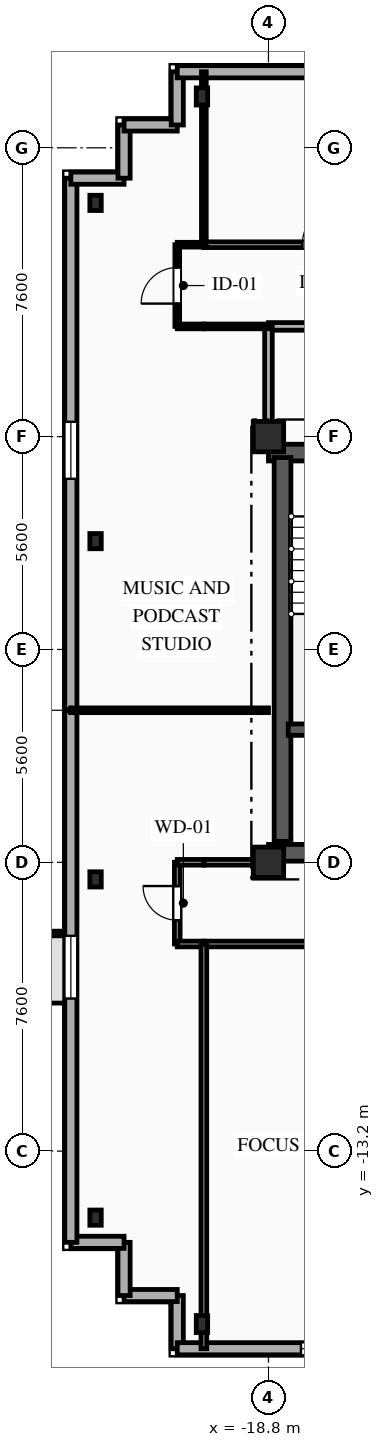
"""IFC4 building model, lengths in metres.
Left out: names, types, materials, properties, quantities, classifications, styles, units other than length and angle.
Written with IfcOpenShell. Run it as: python <this file> out.ifc"""

import sys

from ifc_helpers import new_model, si_unit, direction, frame, frame_2d, origin, origin_2d, place, context, subcontext, project, spatial, rectangle, i_section, extrude, element, fill, save


model = new_model("IFC4")
c1 = context("Model", 3, precision=1e-05, world=origin(), true_north=direction((0.0, 1.0)))
c2 = subcontext(c1, "Body", "Model", "MODEL_VIEW")
j1 = project(units=[si_unit("LENGTHUNIT", "METRE"), si_unit("PLANEANGLEUNIT", "RADIAN")], contexts=[c1])
p1 = place(None, origin())
s1 = spatial("IfcSite", under=j1, at=p1, CompositionType="ELEMENT")
p2 = place(p1, origin())
s2 = spatial("IfcBuilding", under=s1, at=p2, CompositionType="ELEMENT")
p3 = place(p2, frame((0.0, 0.0, 235.0)))
s3 = spatial("IfcBuildingStorey", under=s2, at=p3, CompositionType="ELEMENT", Elevation=235.0)
for number, where, z_axis, x_axis in (
    (1, (-18.8, -5.6, 0.0), (0.0, 0.0, 1.0), (1.0, 0.0, 0.0)),
    (2, (-18.8, 5.6, 0.0), (0.0, 0.0, 1.0), (1.0, 0.0, 0.0)),
):
    element("IfcColumn", number, at=place(p3, frame(where, z_axis=z_axis, x_axis=x_axis)), inside=s3, PredefinedType="COLUMN", context=c2, shape_type="SweptSolid", body=[
        extrude(rectangle(XDim=0.8, YDim=0.8, at=origin_2d()), origin(), (0.0, 0.0, 1.0), 3.35),
    ])
for number, where, z_axis, x_axis in (
    (3, (-20.55, -17.75, 0.0), (0.0, 0.0, 1.0), (1.0, 0.0, 0.0)),
    (4, (-20.55, 14.55, 0.0), (0.0, 0.0, 1.0), (1.0, 0.0, 0.0)),
):
    element("IfcColumn", number, at=place(p3, frame(where, z_axis=z_axis, x_axis=x_axis)), inside=s3, PredefinedType="COLUMN", context=c2, shape_type="SweptSolid", body=[
        extrude(i_section(OverallWidth=0.3, OverallDepth=0.45, WebThickness=0.014, FlangeThickness=0.026, FilletRadius=0.027, at=origin_2d()), origin(), (0.0, 0.0, 1.0), 3.35),
    ])
for number, where, z_axis, x_axis in (
    (5, (-23.35, 11.75, 0.0), (0.0, 0.0, 1.0), (1.0, 0.0, 0.0)),
    (6, (-23.35, 2.85, 0.0), (0.0, 0.0, 1.0), (1.0, 0.0, 0.0)),
    (7, (-23.35, -6.05, 0.0), (0.0, 0.0, 1.0), (1.0, 0.0, 0.0)),
    (8, (-23.35, -14.95, 0.0), (0.0, 0.0, 1.0), (1.0, 0.0, 0.0)),
):
    element("IfcColumn", number, at=place(p3, frame(where, z_axis=z_axis, x_axis=x_axis)), inside=s3, PredefinedType="COLUMN", context=c2, shape_type="SweptSolid", body=[
        extrude(i_section(OverallWidth=0.3, OverallDepth=0.4, WebThickness=0.013, FlangeThickness=0.024, FilletRadius=0.027, at=origin_2d()), origin(), (0.0, 0.0, 1.0), 3.35),
    ])
p4 = place(p3, frame((-21.2, -18.4, 0.0), z_axis=(0.0, 0.0, 1.0), x_axis=(0.0, 1.0, 0.0)))
e9 = element("IfcWall", 9, at=p4, inside=s3, PredefinedType="SOLIDWALL", context=c2, shape_type="SweptSolid", body=[
    extrude(rectangle(XDim=1.4, YDim=0.32, at=frame_2d((0.7, 0.0))), origin(), (0.0, 0.0, 1.0), 3.04),
])
p5 = place(p3, frame((-21.2, -17.0, 0.0), z_axis=(0.0, 0.0, 1.0), x_axis=(-1.0, 0.0, 0.0)))
e10 = element("IfcWall", 10, at=p5, inside=s3, PredefinedType="SOLIDWALL", context=c2, shape_type="SweptSolid", body=[
    extrude(rectangle(XDim=1.4, YDim=0.32, at=frame_2d((0.7, 0.0))), origin(), (0.0, 0.0, 1.0), 3.04),
])
for number, where, z_axis, x_axis in (
    (11, (-22.6, -17.0, 0.0), (0.0, 0.0, 1.0), (0.0, 1.0, 0.0)),
    (12, (-22.6, -15.6, 0.0), (0.0, 0.0, 1.0), (-1.0, 0.0, 0.0)),
):
    element("IfcWall", number, at=place(p3, frame(where, z_axis=z_axis, x_axis=x_axis)), inside=s3, PredefinedType="SOLIDWALL", context=c2, shape_type="SweptSolid", body=[
        extrude(rectangle(XDim=1.4, YDim=0.32, at=frame_2d((0.7, 0.0))), origin(), (0.0, 0.0, 1.0), 3.04),
    ])
p6 = place(p3, frame((-24.0, -15.6, 0.0), z_axis=(0.0, 0.0, 1.0), x_axis=(0.0, 1.0, 0.0)))
e13 = element("IfcWall", 13, at=p6, inside=s3, PredefinedType="SOLIDWALL", context=c2, shape_type="SweptSolid", body=[
    extrude(rectangle(XDim=28.0, YDim=0.32, at=frame_2d((14.0, 0.0))), origin(), (0.0, 0.0, 1.0), 3.04),
])
p7 = place(p6, frame((6.415, 0.0, 0.85)))
e14 = element("IfcOpeningElement", 14, at=p7, cuts=e13, PredefinedType="OPENING", context=c2, shape_type="SweptSolid", body=[
    extrude(rectangle(XDim=1.65, YDim=1.85, at=frame_2d((0.825, 0.925))), frame((0.0, 0.17, 0.0), z_axis=(0.0, -1.0, 0.0), x_axis=(1.0, 0.0, 0.0)), (0.0, 0.0, 1.0), 0.34),
])
p8 = place(p6, frame((20.09, 0.0, 0.85)))
e15 = element("IfcOpeningElement", 15, at=p8, cuts=e13, PredefinedType="OPENING", context=c2, shape_type="SweptSolid", body=[
    extrude(rectangle(XDim=1.5, YDim=1.85, at=frame_2d((0.75, 0.925))), frame((0.0, 0.17, 0.0), z_axis=(0.0, -1.0, 0.0), x_axis=(1.0, 0.0, 0.0)), (0.0, 0.0, 1.0), 0.34),
])
p9 = place(p3, frame((-24.0, 12.4, 0.0), z_axis=(0.0, 0.0, 1.0), x_axis=(1.0, 0.0, 0.0)))
e16 = element("IfcWall", 16, at=p9, inside=s3, PredefinedType="SOLIDWALL", context=c2, shape_type="SweptSolid", body=[
    extrude(rectangle(XDim=1.4, YDim=0.32, at=frame_2d((0.7, 0.0))), origin(), (0.0, 0.0, 1.0), 3.04),
])
for number, where, z_axis, x_axis in (
    (17, (-22.6, 12.4, 0.0), (0.0, 0.0, 1.0), (0.0, 1.0, 0.0)),
    (18, (-22.6, 13.8, 0.0), (0.0, 0.0, 1.0), (1.0, 0.0, 0.0)),
):
    element("IfcWall", number, at=place(p3, frame(where, z_axis=z_axis, x_axis=x_axis)), inside=s3, PredefinedType="SOLIDWALL", context=c2, shape_type="SweptSolid", body=[
        extrude(rectangle(XDim=1.4, YDim=0.32, at=frame_2d((0.7, 0.0))), origin(), (0.0, 0.0, 1.0), 3.04),
    ])
p10 = place(p3, frame((-21.2, 13.8, 0.0), z_axis=(0.0, 0.0, 1.0), x_axis=(0.0, 1.0, 0.0)))
e19 = element("IfcWall", 19, at=p10, inside=s3, PredefinedType="SOLIDWALL", context=c2, shape_type="SweptSolid", body=[
    extrude(rectangle(XDim=1.4, YDim=0.32, at=frame_2d((0.7, 0.0))), origin(), (0.0, 0.0, 1.0), 3.04),
])
p11 = place(p3, frame((-21.2, 15.2, 0.0), z_axis=(0.0, 0.0, 1.0), x_axis=(1.0, 0.0, 0.0)))
e20 = element("IfcWall", 20, at=p11, inside=s3, PredefinedType="SOLIDWALL", context=c2, shape_type="SweptSolid", body=[
    extrude(rectangle(XDim=42.0, YDim=0.32, at=frame_2d((21.0, 0.0))), origin(), (0.0, 0.0, 1.0), 3.04),
])
p12 = place(p11, frame((5.015, 0.0, 0.85)))
e21 = element("IfcOpeningElement", 21, at=p12, cuts=e20, PredefinedType="OPENING", context=c2, shape_type="SweptSolid", body=[
    extrude(rectangle(XDim=1.65, YDim=1.85, at=frame_2d((0.825, 0.925))), frame((0.0, 0.17, 0.0), z_axis=(0.0, -1.0, 0.0), x_axis=(1.0, 0.0, 0.0)), (0.0, 0.0, 1.0), 0.34),
])
p13 = place(p11, frame((16.53, 0.0, 0.85)))
e22 = element("IfcOpeningElement", 22, at=p13, cuts=e20, PredefinedType="OPENING", context=c2, shape_type="SweptSolid", body=[
    extrude(rectangle(XDim=1.5, YDim=1.85, at=frame_2d((0.75, 0.925))), frame((0.0, 0.17, 0.0), z_axis=(0.0, -1.0, 0.0), x_axis=(1.0, 0.0, 0.0)), (0.0, 0.0, 1.0), 0.34),
])
p14 = place(p11, frame((25.575, 0.0, 0.85)))
e23 = element("IfcOpeningElement", 23, at=p14, cuts=e20, PredefinedType="OPENING", context=c2, shape_type="SweptSolid", body=[
    extrude(rectangle(XDim=1.65, YDim=1.85, at=frame_2d((0.825, 0.925))), frame((0.0, 0.17, 0.0), z_axis=(0.0, -1.0, 0.0), x_axis=(1.0, 0.0, 0.0)), (0.0, 0.0, 1.0), 0.34),
])
p15 = place(p11, frame((35.735, 0.0, 0.85)))
e24 = element("IfcOpeningElement", 24, at=p15, cuts=e20, PredefinedType="OPENING", context=c2, shape_type="SweptSolid", body=[
    extrude(rectangle(XDim=1.65, YDim=1.85, at=frame_2d((0.825, 0.925))), frame((0.0, 0.17, 0.0), z_axis=(0.0, -1.0, 0.0), x_axis=(1.0, 0.0, 0.0)), (0.0, 0.0, 1.0), 0.34),
])
p16 = place(p3, frame((20.8, -18.4, 0.0), z_axis=(0.0, 0.0, 1.0), x_axis=(-1.0, 0.0, 0.0)))
e25 = element("IfcWall", 25, at=p16, inside=s3, PredefinedType="SOLIDWALL", context=c2, shape_type="SweptSolid", body=[
    extrude(rectangle(XDim=42.0, YDim=0.32, at=frame_2d((21.0, 0.0))), origin(), (0.0, 0.0, 1.0), 3.04),
])
p17 = place(p16, frame((3.015, 0.0, 0.85)))
e26 = element("IfcOpeningElement", 26, at=p17, cuts=e25, PredefinedType="OPENING", context=c2, shape_type="SweptSolid", body=[
    extrude(rectangle(XDim=1.65, YDim=1.85, at=frame_2d((0.825, 0.925))), frame((0.0, 0.17, 0.0), z_axis=(0.0, -1.0, 0.0), x_axis=(1.0, 0.0, 0.0)), (0.0, 0.0, 1.0), 0.34),
])
p18 = place(p16, frame((9.775, 0.0, 0.85)))
e27 = element("IfcOpeningElement", 27, at=p18, cuts=e25, PredefinedType="OPENING", context=c2, shape_type="SweptSolid", body=[
    extrude(rectangle(XDim=1.65, YDim=1.85, at=frame_2d((0.825, 0.925))), frame((0.0, 0.17, 0.0), z_axis=(0.0, -1.0, 0.0), x_axis=(1.0, 0.0, 0.0)), (0.0, 0.0, 1.0), 0.34),
])
p19 = place(p16, frame((19.74, 0.0, 0.85)))
e28 = element("IfcOpeningElement", 28, at=p19, cuts=e25, PredefinedType="OPENING", context=c2, shape_type="SweptSolid", body=[
    extrude(rectangle(XDim=2.2, YDim=1.85, at=frame_2d((1.1, 0.925))), frame((0.0, 0.17, 0.0), z_axis=(0.0, -1.0, 0.0), x_axis=(1.0, 0.0, 0.0)), (0.0, 0.0, 1.0), 0.34),
])
p20 = place(p16, frame((30.255, 0.0, 0.85)))
e29 = element("IfcOpeningElement", 29, at=p20, cuts=e25, PredefinedType="OPENING", context=c2, shape_type="SweptSolid", body=[
    extrude(rectangle(XDim=1.65, YDim=1.85, at=frame_2d((0.825, 0.925))), frame((0.0, 0.17, 0.0), z_axis=(0.0, -1.0, 0.0), x_axis=(1.0, 0.0, 0.0)), (0.0, 0.0, 1.0), 0.34),
])
p21 = place(p16, frame((37.095, 0.0, 0.85)))
e30 = element("IfcOpeningElement", 30, at=p21, cuts=e25, PredefinedType="OPENING", context=c2, shape_type="SweptSolid", body=[
    extrude(rectangle(XDim=1.65, YDim=1.85, at=frame_2d((0.825, 0.925))), frame((0.0, 0.17, 0.0), z_axis=(0.0, -1.0, 0.0), x_axis=(1.0, 0.0, 0.0)), (0.0, 0.0, 1.0), 0.34),
])
p22 = place(p3, frame((-18.8, 5.18, 0.0), z_axis=(0.0, 0.0, 1.0), x_axis=(1.0, 0.0, 0.0)))
e31 = element("IfcWall", 31, at=p22, inside=s3, PredefinedType="SHEAR", context=c2, shape_type="SweptSolid", body=[
    extrude(rectangle(XDim=9.6, YDim=0.44, at=frame_2d((4.8, 0.0))), origin(), (0.0, 0.0, 1.0), 3.04),
])
p23 = place(p22, frame((1.55, 0.0, 0.0)))
e32 = element("IfcOpeningElement", 32, at=p23, cuts=e31, PredefinedType="OPENING", context=c2, shape_type="SweptSolid", body=[
    extrude(rectangle(XDim=1.1, YDim=2.15, at=frame_2d((0.55, 1.075))), frame((0.0, 0.23, 0.0), z_axis=(0.0, -1.0, 0.0), x_axis=(1.0, 0.0, 0.0)), (0.0, 0.0, 1.0), 0.46),
])
p24 = place(p22, frame((4.775, 0.0, 0.0)))
e33 = element("IfcOpeningElement", 33, at=p24, cuts=e31, PredefinedType="OPENING", context=c2, shape_type="SweptSolid", body=[
    extrude(rectangle(XDim=1.05, YDim=2.1, at=frame_2d((0.525, 1.05))), frame((0.0, 0.23, 0.0), z_axis=(0.0, -1.0, 0.0), x_axis=(1.0, 0.0, 0.0)), (0.0, 0.0, 1.0), 0.46),
])
p25 = place(p3, frame((-18.8, -5.35, 0.0), z_axis=(0.0, 0.0, 1.0), x_axis=(1.0, 0.0, 0.0)))
e34 = element("IfcWall", 34, at=p25, inside=s3, PredefinedType="SHEAR", context=c2, shape_type="SweptSolid", body=[
    extrude(rectangle(XDim=9.6, YDim=0.44, at=frame_2d((4.8, 0.0))), origin(), (0.0, 0.0, 1.0), 3.04),
])
p26 = place(p25, frame((1.05, 0.0, 0.0)))
e35 = element("IfcOpeningElement", 35, at=p26, cuts=e34, PredefinedType="OPENING", context=c2, shape_type="SweptSolid", body=[
    extrude(rectangle(XDim=0.9, YDim=2.1, at=frame_2d((0.45, 1.05))), frame((0.0, 0.23, 0.0), z_axis=(0.0, -1.0, 0.0), x_axis=(1.0, 0.0, 0.0)), (0.0, 0.0, 1.0), 0.46),
])
p27 = place(p3, frame((-18.43, -5.05, 0.0), z_axis=(0.0, 0.0, 1.0), x_axis=(0.0, 1.0, 0.0)))
e36 = element("IfcWall", 36, at=p27, inside=s3, PredefinedType="SHEAR", context=c2, shape_type="SweptSolid", body=[
    extrude(rectangle(XDim=10.1, YDim=0.44, at=frame_2d((5.05, 0.0))), origin(), (0.0, 0.0, 1.0), 3.04),
])
p28 = place(p3, frame((-18.28, -2.11, 0.0), z_axis=(0.0, 0.0, 1.0), x_axis=(1.0, 0.0, 0.0)))
e37 = element("IfcWall", 37, at=p28, inside=s3, PredefinedType="SHEAR", context=c2, shape_type="SweptSolid", body=[
    extrude(rectangle(XDim=3.18, YDim=0.3, at=frame_2d((1.59, 0.0))), origin(), (0.0, 0.0, 1.0), 3.04),
])
p29 = place(p3, frame((-12.0, 8.5, 0.0), z_axis=(0.0, 0.0, 1.0), x_axis=(-1.0, 0.0, 0.0)))
e38 = element("IfcWall", 38, at=p29, inside=s3, PredefinedType="PARTITIONING", context=c2, shape_type="SweptSolid", body=[
    extrude(rectangle(XDim=6.8, YDim=0.2, at=frame_2d((3.4, 0.0))), origin(), (0.0, 0.0, 1.0), 3.04),
])
p30 = place(p29, frame((1.715, 0.0, 0.0)))
e39 = element("IfcOpeningElement", 39, at=p30, cuts=e38, PredefinedType="OPENING", context=c2, shape_type="SweptSolid", body=[
    extrude(rectangle(XDim=1.1, YDim=2.15, at=frame_2d((0.55, 1.075))), frame((0.0, 0.11, 0.0), z_axis=(0.0, -1.0, 0.0), x_axis=(1.0, 0.0, 0.0)), (0.0, 0.0, 1.0), 0.22),
])
p31 = place(p3, frame((-18.8, 8.5, 0.0), z_axis=(0.0, 0.0, 1.0), x_axis=(0.0, -1.0, 0.0)))
e40 = element("IfcWall", 40, at=p31, inside=s3, PredefinedType="PARTITIONING", context=c2, shape_type="SweptSolid", body=[
    extrude(rectangle(XDim=2.9, YDim=0.2, at=frame_2d((1.45, 0.0))), origin(), (0.0, 0.0, 1.0), 2.665),
])
p32 = place(p3, frame((-21.2, 8.5, 0.0), z_axis=(0.0, 0.0, 1.0), x_axis=(0.0, 1.0, 0.0)))
e41 = element("IfcWall", 41, at=p32, inside=s3, PredefinedType="PARTITIONING", context=c2, shape_type="SweptSolid", body=[
    extrude(rectangle(XDim=2.15, YDim=0.125, at=frame_2d((1.075, 0.0))), origin(), (0.0, 0.0, 1.0), 2.695),
])
p33 = place(p32, frame((0.6, 0.0, 0.0)))
e42 = element("IfcOpeningElement", 42, at=p33, cuts=e41, PredefinedType="OPENING", context=c2, shape_type="SweptSolid", body=[
    extrude(rectangle(XDim=0.95, YDim=2.1, at=frame_2d((0.475, 1.05))), frame((0.0, 0.073, 0.0), z_axis=(0.0, -1.0, 0.0), x_axis=(1.0, 0.0, 0.0)), (0.0, 0.0, 1.0), 0.145),
])
p34 = place(p3, frame((-18.8, 8.5, 0.0), z_axis=(0.0, 0.0, 1.0), x_axis=(-1.0, 0.0, 0.0)))
e43 = element("IfcWall", 43, at=p34, inside=s3, PredefinedType="PARTITIONING", context=c2, shape_type="SweptSolid", body=[
    extrude(rectangle(XDim=1.7, YDim=0.125, at=frame_2d((0.85, 0.0))), origin(), (0.0, 0.0, 1.0), 3.04),
])
for number, where, z_axis, x_axis in (
    (44, (-20.5, 8.5, 0.0), (0.0, 0.0, 1.0), (-1.0, 0.0, 0.0)),
    (45, (-21.2, 10.65, 0.0), (0.0, 0.0, 1.0), (1.0, 0.0, 0.0)),
):
    element("IfcWall", number, at=place(p3, frame(where, z_axis=z_axis, x_axis=x_axis)), inside=s3, PredefinedType="PARTITIONING", context=c2, shape_type="SweptSolid", body=[
        extrude(rectangle(XDim=0.7, YDim=0.125, at=frame_2d((0.35, 0.0))), origin(), (0.0, 0.0, 1.0), 3.04),
    ])
p35 = place(p3, frame((-20.5, 10.65, 0.0), z_axis=(0.0, 0.0, 1.0), x_axis=(1.0, 0.0, 0.0)))
e46 = element("IfcWall", 46, at=p35, inside=s3, PredefinedType="PARTITIONING", context=c2, shape_type="SweptSolid", body=[
    extrude(rectangle(XDim=10.25, YDim=0.15, at=frame_2d((5.125, 0.0))), origin(), (0.0, 0.0, 1.0), 3.04),
])
p36 = place(p35, frame((2.59, 0.0, 0.0)))
e47 = element("IfcOpeningElement", 47, at=p36, cuts=e46, PredefinedType="OPENING", context=c2, shape_type="SweptSolid", body=[
    extrude(rectangle(XDim=1.05, YDim=2.15, at=frame_2d((0.525, 1.075))), frame((0.0, 0.085, 0.0), z_axis=(0.0, -1.0, 0.0), x_axis=(1.0, 0.0, 0.0)), (0.0, 0.0, 1.0), 0.17),
])
p37 = place(p3, frame((-21.2, -7.75, 0.0), z_axis=(0.0, 0.0, 1.0), x_axis=(0.0, 1.0, 0.0)))
e48 = element("IfcWall", 48, at=p37, inside=s3, PredefinedType="PARTITIONING", context=c2, shape_type="SweptSolid", body=[
    extrude(rectangle(XDim=2.15, YDim=0.15, at=frame_2d((1.075, 0.0))), origin(), (0.0, 0.0, 1.0), 2.695),
])
p38 = place(p37, frame((0.625, 0.0, 0.0)))
e49 = element("IfcOpeningElement", 49, at=p38, cuts=e48, PredefinedType="OPENING", context=c2, shape_type="SweptSolid", body=[
    extrude(rectangle(XDim=0.9, YDim=2.1, at=frame_2d((0.45, 1.05))), frame((0.0, 0.085, 0.0), z_axis=(0.0, -1.0, 0.0), x_axis=(1.0, 0.0, 0.0)), (0.0, 0.0, 1.0), 0.17),
])
p39 = place(p3, frame((-20.5, -5.6, 0.0), z_axis=(0.0, 0.0, 1.0), x_axis=(1.0, 0.0, 0.0)))
e50 = element("IfcWall", 50, at=p39, inside=s3, PredefinedType="PARTITIONING", context=c2, shape_type="SweptSolid", body=[
    extrude(rectangle(XDim=1.7, YDim=0.15, at=frame_2d((0.85, 0.0))), origin(), (0.0, 0.0, 1.0), 3.04),
])
for number, where, z_axis, x_axis in (
    (51, (-20.5, -7.75, 0.0), (0.0, 0.0, 1.0), (-1.0, 0.0, 0.0)),
    (52, (-21.2, -5.6, 0.0), (0.0, 0.0, 1.0), (1.0, 0.0, 0.0)),
):
    element("IfcWall", number, at=place(p3, frame(where, z_axis=z_axis, x_axis=x_axis)), inside=s3, PredefinedType="PARTITIONING", context=c2, shape_type="SweptSolid", body=[
        extrude(rectangle(XDim=0.7, YDim=0.15, at=frame_2d((0.35, 0.0))), origin(), (0.0, 0.0, 1.0), 3.04),
    ])
p40 = place(p3, frame((-13.667, -7.75, 0.0), z_axis=(0.0, 0.0, 1.0), x_axis=(-1.0, 0.0, 0.0)))
e53 = element("IfcWall", 53, at=p40, inside=s3, PredefinedType="PARTITIONING", context=c2, shape_type="SweptSolid", body=[
    extrude(rectangle(XDim=6.833, YDim=0.15, at=frame_2d((3.417, 0.0))), origin(), (0.0, 0.0, 1.0), 3.04),
])
p41 = place(p40, frame((1.158, 0.0, 0.0)))
e54 = element("IfcOpeningElement", 54, at=p41, cuts=e53, PredefinedType="OPENING", context=c2, shape_type="SweptSolid", body=[
    extrude(rectangle(XDim=1.05, YDim=2.15, at=frame_2d((0.525, 1.075))), frame((0.0, 0.085, 0.0), z_axis=(0.0, -1.0, 0.0), x_axis=(1.0, 0.0, 0.0)), (0.0, 0.0, 1.0), 0.17),
])
p42 = place(p3, frame((-24.0, -1.6, 0.0), z_axis=(0.0, 0.0, 1.0), x_axis=(1.0, 0.0, 0.0)))
e55 = element("IfcWall", 55, at=p42, inside=s3, PredefinedType="PARTITIONING", context=c2, shape_type="SweptSolid", body=[
    extrude(rectangle(XDim=5.2, YDim=0.125, at=frame_2d((2.6, 0.0))), origin(), (0.0, 0.0, 1.0), 3.04),
])
p43 = place(p3, frame((-20.5, -7.75, 0.0), z_axis=(0.0, 0.0, 1.0), x_axis=(0.0, -1.0, 0.0)))
e56 = element("IfcWall", 56, at=p43, inside=s3, PredefinedType="PARTITIONING", context=c2, shape_type="SweptSolid", body=[
    extrude(rectangle(XDim=10.65, YDim=0.15, at=frame_2d((5.325, 0.0))), origin(), (0.0, 0.0, 1.0), 2.665),
])
p44 = place(p3, frame((-20.5, 15.2, 0.0), z_axis=(0.0, 0.0, 1.0), x_axis=(0.0, -1.0, 0.0)))
e57 = element("IfcWall", 57, at=p44, inside=s3, PredefinedType="PARTITIONING", context=c2, shape_type="SweptSolid", body=[
    extrude(rectangle(XDim=4.55, YDim=0.125, at=frame_2d((2.275, 0.0))), origin(), (0.0, 0.0, 1.0), 2.665),
])
p45 = place(p7, origin())
e58 = element("IfcWindow", 58, at=p45, inside=s3, PartitioningType="SINGLE_PANEL", PredefinedType="WINDOW", context=c2, shape_type="SweptSolid", body=[
    extrude(rectangle(XDim=1.65, YDim=1.85, at=frame_2d((0.825, 0.925))), frame((0.0, 0.03, 0.0), z_axis=(0.0, -1.0, 0.0), x_axis=(1.0, 0.0, 0.0)), (0.0, 0.0, 1.0), 0.06),
])
fill(e14, e58)
p46 = place(p8, origin())
e59 = element("IfcWindow", 59, at=p46, inside=s3, PartitioningType="SINGLE_PANEL", PredefinedType="WINDOW", context=c2, shape_type="SweptSolid", body=[
    extrude(rectangle(XDim=1.5, YDim=1.85, at=frame_2d((0.75, 0.925))), frame((0.0, 0.03, 0.0), z_axis=(0.0, -1.0, 0.0), x_axis=(1.0, 0.0, 0.0)), (0.0, 0.0, 1.0), 0.06),
])
fill(e15, e59)
p47 = place(p21, origin())
e60 = element("IfcWindow", 60, at=p47, inside=s3, PartitioningType="SINGLE_PANEL", PredefinedType="WINDOW", context=c2, shape_type="SweptSolid", body=[
    extrude(rectangle(XDim=1.65, YDim=1.85, at=frame_2d((0.825, 0.925))), frame((0.0, 0.03, 0.0), z_axis=(0.0, -1.0, 0.0), x_axis=(1.0, 0.0, 0.0)), (0.0, 0.0, 1.0), 0.06),
])
fill(e30, e60)
p48 = place(p33, origin())
e61 = element("IfcDoor", 61, at=p48, inside=s3, OperationType="SINGLE_SWING_LEFT", PredefinedType="DOOR", context=c2, shape_type="SweptSolid", body=[
    extrude(rectangle(XDim=0.95, YDim=2.1, at=frame_2d((0.475, 1.05))), frame((0.0, 0.025, 0.0), z_axis=(0.0, -1.0, 0.0), x_axis=(1.0, 0.0, 0.0)), (0.0, 0.0, 1.0), 0.05),
])
fill(e42, e61)
p49 = place(p36, origin())
e62 = element("IfcDoor", 62, at=p49, inside=s3, OperationType="SINGLE_SWING_RIGHT", PredefinedType="DOOR", context=c2, shape_type="SweptSolid", body=[
    extrude(rectangle(XDim=1.05, YDim=2.15, at=frame_2d((0.525, 1.075))), frame((0.0, 0.025, 0.0), z_axis=(0.0, -1.0, 0.0), x_axis=(1.0, 0.0, 0.0)), (0.0, 0.0, 1.0), 0.05),
])
fill(e47, e62)
p50 = place(p38, origin())
e63 = element("IfcDoor", 63, at=p50, inside=s3, OperationType="SINGLE_SWING_RIGHT", PredefinedType="DOOR", context=c2, shape_type="SweptSolid", body=[
    extrude(rectangle(XDim=0.9, YDim=2.1, at=frame_2d((0.45, 1.05))), frame((0.0, 0.025, 0.0), z_axis=(0.0, -1.0, 0.0), x_axis=(1.0, 0.0, 0.0)), (0.0, 0.0, 1.0), 0.05),
])
fill(e49, e63)
save(model, sys.argv[1])
